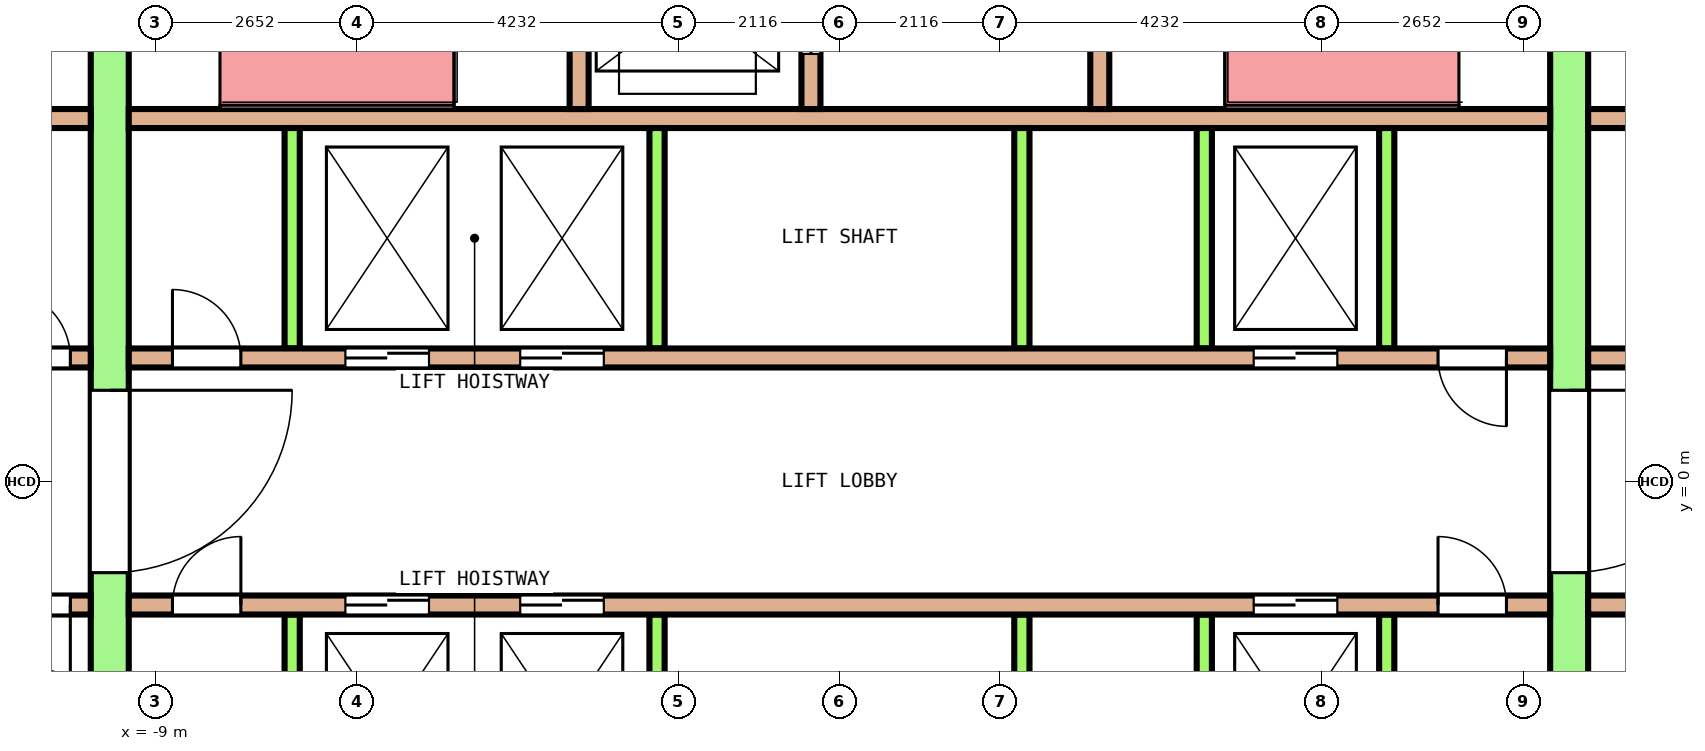
"""IFC4 building model, lengths in metres.
Left out: names, types, materials, properties, quantities, classifications, styles, units other than length and angle.
Written with IfcOpenShell. Run it as: python <this file> out.ifc"""

import sys

from ifc_helpers import new_model, si_unit, direction, frame, frame_2d, origin, place, context, subcontext, project, spatial, rectangle, extrude, element, fill, save


model = new_model("IFC4")
c1 = context("Model", 3, precision=1e-05, world=origin(), true_north=direction((0.0, 1.0)))
c2 = subcontext(c1, "Body", "Model", "MODEL_VIEW")
j1 = project(units=[si_unit("LENGTHUNIT", "METRE"), si_unit("PLANEANGLEUNIT", "RADIAN")], contexts=[c1])
p1 = place(None, origin())
s1 = spatial("IfcSite", under=j1, at=p1, CompositionType="ELEMENT")
p2 = place(p1, origin())
s2 = spatial("IfcBuilding", under=s1, at=p2, CompositionType="ELEMENT")
p3 = place(p2, frame((0.0, 0.0, 154.0)))
s3 = spatial("IfcBuildingStorey", under=s2, at=p3, CompositionType="ELEMENT", Elevation=154.0)
p4 = place(p3, frame((-9.6, -7.75, 0.0), z_axis=(0.0, 0.0, 1.0), x_axis=(0.0, 1.0, 0.0)))
e1 = element("IfcWall", 1, at=p4, inside=s3, PredefinedType="SHEAR", context=c2, shape_type="SweptSolid", body=[
    extrude(rectangle(XDim=15.5, YDim=0.5, at=frame_2d((7.75, 0.0))), origin(), (0.0, 0.0, 1.0), 4.1),
])
p5 = place(p4, frame((6.55, 0.0, 0.0)))
e2 = element("IfcOpeningElement", 2, at=p5, cuts=e1, PredefinedType="OPENING", context=c2, shape_type="SweptSolid", body=[
    extrude(rectangle(XDim=2.4, YDim=2.1, at=frame_2d((1.2, 1.05))), frame((0.0, 0.26, 0.0), z_axis=(0.0, -1.0, 0.0), x_axis=(1.0, 0.0, 0.0)), (0.0, 0.0, 1.0), 0.52),
])
p6 = place(p4, frame((13.45, 0.0, 0.0)))
e3 = element("IfcOpeningElement", 3, at=p6, cuts=e1, PredefinedType="OPENING", context=c2, shape_type="SweptSolid", body=[
    extrude(rectangle(XDim=1.2, YDim=2.1, at=frame_2d((0.6, 1.05))), frame((0.0, 0.26, 0.0), z_axis=(0.0, -1.0, 0.0), x_axis=(1.0, 0.0, 0.0)), (0.0, 0.0, 1.0), 0.52),
])
p7 = place(p4, frame((0.85, 0.0, 0.0)))
e4 = element("IfcOpeningElement", 4, at=p7, cuts=e1, PredefinedType="OPENING", context=c2, shape_type="SweptSolid", body=[
    extrude(rectangle(XDim=1.2, YDim=2.1, at=frame_2d((0.6, 1.05))), frame((0.0, 0.26, 0.0), z_axis=(0.0, -1.0, 0.0), x_axis=(1.0, 0.0, 0.0)), (0.0, 0.0, 1.0), 0.52),
])
p8 = place(p3, frame((9.6, -7.75, 0.0), z_axis=(0.0, 0.0, 1.0), x_axis=(0.0, 1.0, 0.0)))
e5 = element("IfcWall", 5, at=p8, inside=s3, PredefinedType="SHEAR", context=c2, shape_type="SweptSolid", body=[
    extrude(rectangle(XDim=15.5, YDim=0.5, at=frame_2d((7.75, 0.0))), origin(), (0.0, 0.0, 1.0), 4.1),
])
p9 = place(p8, frame((6.55, 0.0, 0.0)))
e6 = element("IfcOpeningElement", 6, at=p9, cuts=e5, PredefinedType="OPENING", context=c2, shape_type="SweptSolid", body=[
    extrude(rectangle(XDim=2.4, YDim=2.1, at=frame_2d((1.2, 1.05))), frame((0.0, 0.26, 0.0), z_axis=(0.0, -1.0, 0.0), x_axis=(1.0, 0.0, 0.0)), (0.0, 0.0, 1.0), 0.52),
])
p10 = place(p8, frame((13.45, 0.0, 0.0)))
e7 = element("IfcOpeningElement", 7, at=p10, cuts=e5, PredefinedType="OPENING", context=c2, shape_type="SweptSolid", body=[
    extrude(rectangle(XDim=1.2, YDim=2.1, at=frame_2d((0.6, 1.05))), frame((0.0, 0.26, 0.0), z_axis=(0.0, -1.0, 0.0), x_axis=(1.0, 0.0, 0.0)), (0.0, 0.0, 1.0), 0.52),
])
p11 = place(p8, frame((0.95, 0.0, 0.0)))
e8 = element("IfcOpeningElement", 8, at=p11, cuts=e5, PredefinedType="OPENING", context=c2, shape_type="SweptSolid", body=[
    extrude(rectangle(XDim=1.0, YDim=2.1, at=frame_2d((0.5, 1.05))), frame((0.0, 0.26, 0.0), z_axis=(0.0, -1.0, 0.0), x_axis=(1.0, 0.0, 0.0)), (0.0, 0.0, 1.0), 0.52),
])
p12 = place(p3, frame((-12.85, 1.625, 0.0), z_axis=(0.0, 0.0, 1.0), x_axis=(1.0, 0.0, 0.0)))
e9 = element("IfcWall", 9, at=p12, inside=s3, PredefinedType="SOLIDWALL", context=c2, shape_type="SweptSolid", body=[
    extrude(rectangle(XDim=3.0, YDim=0.25, at=frame_2d((1.5, 0.0))), origin(), (0.0, 0.0, 1.0), 4.1),
])
p13 = place(p12, frame((0.269, 0.0, 0.0)))
e10 = element("IfcOpeningElement", 10, at=p13, cuts=e9, PredefinedType="OPENING", context=c2, shape_type="SweptSolid", body=[
    extrude(rectangle(XDim=0.9, YDim=2.1, at=frame_2d((0.45, 1.05))), frame((0.0, 0.135, 0.0), z_axis=(0.0, -1.0, 0.0), x_axis=(1.0, 0.0, 0.0)), (0.0, 0.0, 1.0), 0.27),
])
p14 = place(p12, frame((1.831, 0.0, 0.0)))
e11 = element("IfcOpeningElement", 11, at=p14, cuts=e9, PredefinedType="OPENING", context=c2, shape_type="SweptSolid", body=[
    extrude(rectangle(XDim=0.9, YDim=2.1, at=frame_2d((0.45, 1.05))), frame((0.0, 0.135, 0.0), z_axis=(0.0, -1.0, 0.0), x_axis=(1.0, 0.0, 0.0)), (0.0, 0.0, 1.0), 0.27),
])
p15 = place(p3, frame((-9.35, 1.625, 0.0), z_axis=(0.0, 0.0, 1.0), x_axis=(1.0, 0.0, 0.0)))
e12 = element("IfcWall", 12, at=p15, inside=s3, PredefinedType="SOLIDWALL", context=c2, shape_type="SweptSolid", body=[
    extrude(rectangle(XDim=18.7, YDim=0.25, at=frame_2d((9.35, 0.0))), origin(), (0.0, 0.0, 1.0), 4.1),
])
p16 = place(p15, frame((2.85, 0.0, 0.0)))
e13 = element("IfcOpeningElement", 13, at=p16, cuts=e12, PredefinedType="OPENING", context=c2, shape_type="SweptSolid", body=[
    extrude(rectangle(XDim=1.1, YDim=2.1, at=frame_2d((0.55, 1.05))), frame((0.0, 0.135, 0.0), z_axis=(0.0, -1.0, 0.0), x_axis=(1.0, 0.0, 0.0)), (0.0, 0.0, 1.0), 0.27),
])
p17 = place(p15, frame((5.15, 0.0, 0.0)))
e14 = element("IfcOpeningElement", 14, at=p17, cuts=e12, PredefinedType="OPENING", context=c2, shape_type="SweptSolid", body=[
    extrude(rectangle(XDim=1.1, YDim=2.1, at=frame_2d((0.55, 1.05))), frame((0.0, 0.135, 0.0), z_axis=(0.0, -1.0, 0.0), x_axis=(1.0, 0.0, 0.0)), (0.0, 0.0, 1.0), 0.27),
])
p18 = place(p15, frame((14.8, 0.0, 0.0)))
e15 = element("IfcOpeningElement", 15, at=p18, cuts=e12, PredefinedType="OPENING", context=c2, shape_type="SweptSolid", body=[
    extrude(rectangle(XDim=1.1, YDim=2.1, at=frame_2d((0.55, 1.05))), frame((0.0, 0.135, 0.0), z_axis=(0.0, -1.0, 0.0), x_axis=(1.0, 0.0, 0.0)), (0.0, 0.0, 1.0), 0.27),
])
p19 = place(p15, frame((0.575, 0.0, 0.0)))
e16 = element("IfcOpeningElement", 16, at=p19, cuts=e12, PredefinedType="OPENING", context=c2, shape_type="SweptSolid", body=[
    extrude(rectangle(XDim=0.9, YDim=2.1, at=frame_2d((0.45, 1.05))), frame((0.0, 0.135, 0.0), z_axis=(0.0, -1.0, 0.0), x_axis=(1.0, 0.0, 0.0)), (0.0, 0.0, 1.0), 0.27),
])
p20 = place(p15, frame((17.225, 0.0, 0.0)))
e17 = element("IfcOpeningElement", 17, at=p20, cuts=e12, PredefinedType="OPENING", context=c2, shape_type="SweptSolid", body=[
    extrude(rectangle(XDim=0.9, YDim=2.1, at=frame_2d((0.45, 1.05))), frame((0.0, 0.135, 0.0), z_axis=(0.0, -1.0, 0.0), x_axis=(1.0, 0.0, 0.0)), (0.0, 0.0, 1.0), 0.27),
])
p21 = place(p3, frame((9.85, 1.625, 0.0), z_axis=(0.0, 0.0, 1.0), x_axis=(1.0, 0.0, 0.0)))
e18 = element("IfcWall", 18, at=p21, inside=s3, PredefinedType="SOLIDWALL", context=c2, shape_type="SweptSolid", body=[
    extrude(rectangle(XDim=3.0, YDim=0.25, at=frame_2d((1.5, 0.0))), origin(), (0.0, 0.0, 1.0), 4.1),
])
p22 = place(p21, frame((1.05, 0.0, 0.0)))
e19 = element("IfcOpeningElement", 19, at=p22, cuts=e18, PredefinedType="OPENING", context=c2, shape_type="SweptSolid", body=[
    extrude(rectangle(XDim=0.9, YDim=2.1, at=frame_2d((0.45, 1.05))), frame((0.0, 0.135, 0.0), z_axis=(0.0, -1.0, 0.0), x_axis=(1.0, 0.0, 0.0)), (0.0, 0.0, 1.0), 0.27),
])
p23 = place(p3, frame((-12.85, 4.775, 0.0), z_axis=(0.0, 0.0, 1.0), x_axis=(1.0, 0.0, 0.0)))
e20 = element("IfcWall", 20, at=p23, inside=s3, PredefinedType="SOLIDWALL", context=c2, shape_type="SweptSolid", body=[
    extrude(rectangle(XDim=3.0, YDim=0.25, at=frame_2d((1.5, 0.0))), origin(), (0.0, 0.0, 1.0), 4.1),
])
p24 = place(p3, frame((-9.35, 4.775, 0.0), z_axis=(0.0, 0.0, 1.0), x_axis=(1.0, 0.0, 0.0)))
e21 = element("IfcWall", 21, at=p24, inside=s3, PredefinedType="SOLIDWALL", context=c2, shape_type="SweptSolid", body=[
    extrude(rectangle(XDim=18.7, YDim=0.25, at=frame_2d((9.35, 0.0))), origin(), (0.0, 0.0, 1.0), 4.1),
])
p25 = place(p3, frame((9.85, 4.775, 0.0), z_axis=(0.0, 0.0, 1.0), x_axis=(1.0, 0.0, 0.0)))
e22 = element("IfcWall", 22, at=p25, inside=s3, PredefinedType="SOLIDWALL", context=c2, shape_type="SweptSolid", body=[
    extrude(rectangle(XDim=3.0, YDim=0.25, at=frame_2d((1.5, 0.0))), origin(), (0.0, 0.0, 1.0), 4.1),
])
for number, where, z_axis, x_axis in (
    (23, (-7.2, 1.75, 0.0), (0.0, 0.0, 1.0), (0.0, 1.0, 0.0)),
    (24, (-2.4, 1.75, 0.0), (0.0, 0.0, 1.0), (0.0, 1.0, 0.0)),
    (25, (2.4, 1.75, 0.0), (0.0, 0.0, 1.0), (0.0, 1.0, 0.0)),
    (26, (4.8, 1.75, 0.0), (0.0, 0.0, 1.0), (0.0, 1.0, 0.0)),
    (27, (7.2, 1.75, 0.0), (0.0, 0.0, 1.0), (0.0, 1.0, 0.0)),
):
    element("IfcWall", number, at=place(p3, frame(where, z_axis=z_axis, x_axis=x_axis)), inside=s3, PredefinedType="SOLIDWALL", context=c2, shape_type="SweptSolid", body=[
        extrude(rectangle(XDim=2.9, YDim=0.2, at=frame_2d((1.45, 0.0))), origin(), (0.0, 0.0, 1.0), 4.1),
    ])
p26 = place(p3, frame((-12.85, -1.625, 0.0), z_axis=(0.0, 0.0, 1.0), x_axis=(1.0, 0.0, 0.0)))
e28 = element("IfcWall", 28, at=p26, inside=s3, PredefinedType="SOLIDWALL", context=c2, shape_type="SweptSolid", body=[
    extrude(rectangle(XDim=3.0, YDim=0.25, at=frame_2d((1.5, 0.0))), origin(), (0.0, 0.0, 1.0), 4.1),
])
p27 = place(p26, frame((0.269, 0.0, 0.0)))
e29 = element("IfcOpeningElement", 29, at=p27, cuts=e28, PredefinedType="OPENING", context=c2, shape_type="SweptSolid", body=[
    extrude(rectangle(XDim=0.9, YDim=2.1, at=frame_2d((0.45, 1.05))), frame((0.0, 0.135, 0.0), z_axis=(0.0, -1.0, 0.0), x_axis=(1.0, 0.0, 0.0)), (0.0, 0.0, 1.0), 0.27),
])
p28 = place(p26, frame((1.831, 0.0, 0.0)))
e30 = element("IfcOpeningElement", 30, at=p28, cuts=e28, PredefinedType="OPENING", context=c2, shape_type="SweptSolid", body=[
    extrude(rectangle(XDim=0.9, YDim=2.1, at=frame_2d((0.45, 1.05))), frame((0.0, 0.135, 0.0), z_axis=(0.0, -1.0, 0.0), x_axis=(1.0, 0.0, 0.0)), (0.0, 0.0, 1.0), 0.27),
])
p29 = place(p3, frame((-9.35, -1.625, 0.0), z_axis=(0.0, 0.0, 1.0), x_axis=(1.0, 0.0, 0.0)))
e31 = element("IfcWall", 31, at=p29, inside=s3, PredefinedType="SOLIDWALL", context=c2, shape_type="SweptSolid", body=[
    extrude(rectangle(XDim=18.7, YDim=0.25, at=frame_2d((9.35, 0.0))), origin(), (0.0, 0.0, 1.0), 4.1),
])
p30 = place(p29, frame((2.85, 0.0, 0.0)))
e32 = element("IfcOpeningElement", 32, at=p30, cuts=e31, PredefinedType="OPENING", context=c2, shape_type="SweptSolid", body=[
    extrude(rectangle(XDim=1.1, YDim=2.1, at=frame_2d((0.55, 1.05))), frame((0.0, 0.135, 0.0), z_axis=(0.0, -1.0, 0.0), x_axis=(1.0, 0.0, 0.0)), (0.0, 0.0, 1.0), 0.27),
])
p31 = place(p29, frame((5.15, 0.0, 0.0)))
e33 = element("IfcOpeningElement", 33, at=p31, cuts=e31, PredefinedType="OPENING", context=c2, shape_type="SweptSolid", body=[
    extrude(rectangle(XDim=1.1, YDim=2.1, at=frame_2d((0.55, 1.05))), frame((0.0, 0.135, 0.0), z_axis=(0.0, -1.0, 0.0), x_axis=(1.0, 0.0, 0.0)), (0.0, 0.0, 1.0), 0.27),
])
p32 = place(p29, frame((14.8, 0.0, 0.0)))
e34 = element("IfcOpeningElement", 34, at=p32, cuts=e31, PredefinedType="OPENING", context=c2, shape_type="SweptSolid", body=[
    extrude(rectangle(XDim=1.1, YDim=2.1, at=frame_2d((0.55, 1.05))), frame((0.0, 0.135, 0.0), z_axis=(0.0, -1.0, 0.0), x_axis=(1.0, 0.0, 0.0)), (0.0, 0.0, 1.0), 0.27),
])
p33 = place(p29, frame((0.575, 0.0, 0.0)))
e35 = element("IfcOpeningElement", 35, at=p33, cuts=e31, PredefinedType="OPENING", context=c2, shape_type="SweptSolid", body=[
    extrude(rectangle(XDim=0.9, YDim=2.1, at=frame_2d((0.45, 1.05))), frame((0.0, 0.135, 0.0), z_axis=(0.0, -1.0, 0.0), x_axis=(1.0, 0.0, 0.0)), (0.0, 0.0, 1.0), 0.27),
])
p34 = place(p29, frame((17.225, 0.0, 0.0)))
e36 = element("IfcOpeningElement", 36, at=p34, cuts=e31, PredefinedType="OPENING", context=c2, shape_type="SweptSolid", body=[
    extrude(rectangle(XDim=0.9, YDim=2.1, at=frame_2d((0.45, 1.05))), frame((0.0, 0.135, 0.0), z_axis=(0.0, -1.0, 0.0), x_axis=(1.0, 0.0, 0.0)), (0.0, 0.0, 1.0), 0.27),
])
p35 = place(p3, frame((9.85, -1.625, 0.0), z_axis=(0.0, 0.0, 1.0), x_axis=(1.0, 0.0, 0.0)))
e37 = element("IfcWall", 37, at=p35, inside=s3, PredefinedType="SOLIDWALL", context=c2, shape_type="SweptSolid", body=[
    extrude(rectangle(XDim=3.0, YDim=0.25, at=frame_2d((1.5, 0.0))), origin(), (0.0, 0.0, 1.0), 4.1),
])
p36 = place(p35, frame((1.05, 0.0, 0.0)))
e38 = element("IfcOpeningElement", 38, at=p36, cuts=e37, PredefinedType="OPENING", context=c2, shape_type="SweptSolid", body=[
    extrude(rectangle(XDim=0.9, YDim=2.1, at=frame_2d((0.45, 1.05))), frame((0.0, 0.135, 0.0), z_axis=(0.0, -1.0, 0.0), x_axis=(1.0, 0.0, 0.0)), (0.0, 0.0, 1.0), 0.27),
])
for number, where, z_axis, x_axis in (
    (39, (-7.2, -4.65, 0.0), (0.0, 0.0, 1.0), (0.0, 1.0, 0.0)),
    (40, (-2.4, -4.65, 0.0), (0.0, 0.0, 1.0), (0.0, 1.0, 0.0)),
    (41, (2.4, -4.65, 0.0), (0.0, 0.0, 1.0), (0.0, 1.0, 0.0)),
    (42, (4.8, -4.65, 0.0), (0.0, 0.0, 1.0), (0.0, 1.0, 0.0)),
    (43, (7.2, -4.65, 0.0), (0.0, 0.0, 1.0), (0.0, 1.0, 0.0)),
):
    element("IfcWall", number, at=place(p3, frame(where, z_axis=z_axis, x_axis=x_axis)), inside=s3, PredefinedType="SOLIDWALL", context=c2, shape_type="SweptSolid", body=[
        extrude(rectangle(XDim=2.9, YDim=0.2, at=frame_2d((1.45, 0.0))), origin(), (0.0, 0.0, 1.0), 4.1),
    ])
p37 = place(p3, frame((-3.425, 4.9, 0.0), z_axis=(0.0, 0.0, 1.0), x_axis=(0.0, 1.0, 0.0)))
e44 = element("IfcWall", 44, at=p37, inside=s3, PredefinedType="SOLIDWALL", context=c2, shape_type="SweptSolid", body=[
    extrude(rectangle(XDim=2.85, YDim=0.25, at=frame_2d((1.425, 0.0))), origin(), (0.0, 0.0, 1.0), 4.1),
])
p38 = place(p3, frame((-0.375, 4.9, 0.0), z_axis=(0.0, 0.0, 1.0), x_axis=(0.0, 1.0, 0.0)))
e45 = element("IfcWall", 45, at=p38, inside=s3, PredefinedType="SOLIDWALL", context=c2, shape_type="SweptSolid", body=[
    extrude(rectangle(XDim=2.85, YDim=0.25, at=frame_2d((1.425, 0.0))), origin(), (0.0, 0.0, 1.0), 4.1),
])
p39 = place(p38, frame((0.725, 0.0, 0.0)))
e46 = element("IfcOpeningElement", 46, at=p39, cuts=e45, PredefinedType="OPENING", context=c2, shape_type="SweptSolid", body=[
    extrude(rectangle(XDim=1.4, YDim=2.1, at=frame_2d((0.7, 1.05))), frame((0.0, 0.135, 0.0), z_axis=(0.0, -1.0, 0.0), x_axis=(1.0, 0.0, 0.0)), (0.0, 0.0, 1.0), 0.27),
])
p40 = place(p3, frame((3.425, 4.9, 0.0), z_axis=(0.0, 0.0, 1.0), x_axis=(0.0, 1.0, 0.0)))
e47 = element("IfcWall", 47, at=p40, inside=s3, PredefinedType="SOLIDWALL", context=c2, shape_type="SweptSolid", body=[
    extrude(rectangle(XDim=2.85, YDim=0.25, at=frame_2d((1.425, 0.0))), origin(), (0.0, 0.0, 1.0), 4.1),
])
p41 = place(p16, origin())
e48 = element("IfcDoor", 48, at=p41, inside=s3, OperationType="DOUBLE_DOOR_SLIDING", PredefinedType="DOOR", context=c2, shape_type="SweptSolid", body=[
    extrude(rectangle(XDim=1.1, YDim=2.1, at=frame_2d((0.55, 1.05))), frame((0.0, 0.075, 0.0), z_axis=(0.0, -1.0, 0.0), x_axis=(1.0, 0.0, 0.0)), (0.0, 0.0, 1.0), 0.15),
])
fill(e13, e48)
p42 = place(p17, origin())
e49 = element("IfcDoor", 49, at=p42, inside=s3, OperationType="DOUBLE_DOOR_SLIDING", PredefinedType="DOOR", context=c2, shape_type="SweptSolid", body=[
    extrude(rectangle(XDim=1.1, YDim=2.1, at=frame_2d((0.55, 1.05))), frame((0.0, 0.075, 0.0), z_axis=(0.0, -1.0, 0.0), x_axis=(1.0, 0.0, 0.0)), (0.0, 0.0, 1.0), 0.15),
])
fill(e14, e49)
p43 = place(p18, origin())
e50 = element("IfcDoor", 50, at=p43, inside=s3, OperationType="DOUBLE_DOOR_SLIDING", PredefinedType="DOOR", context=c2, shape_type="SweptSolid", body=[
    extrude(rectangle(XDim=1.1, YDim=2.1, at=frame_2d((0.55, 1.05))), frame((0.0, 0.075, 0.0), z_axis=(0.0, -1.0, 0.0), x_axis=(1.0, 0.0, 0.0)), (0.0, 0.0, 1.0), 0.15),
])
fill(e15, e50)
p44 = place(p30, origin())
e51 = element("IfcDoor", 51, at=p44, inside=s3, OperationType="DOUBLE_DOOR_SLIDING", PredefinedType="DOOR", context=c2, shape_type="SweptSolid", body=[
    extrude(rectangle(XDim=1.1, YDim=2.1, at=frame_2d((0.55, 1.05))), frame((0.0, 0.075, 0.0), z_axis=(0.0, -1.0, 0.0), x_axis=(1.0, 0.0, 0.0)), (0.0, 0.0, 1.0), 0.15),
])
fill(e32, e51)
p45 = place(p31, origin())
e52 = element("IfcDoor", 52, at=p45, inside=s3, OperationType="DOUBLE_DOOR_SLIDING", PredefinedType="DOOR", context=c2, shape_type="SweptSolid", body=[
    extrude(rectangle(XDim=1.1, YDim=2.1, at=frame_2d((0.55, 1.05))), frame((0.0, 0.075, 0.0), z_axis=(0.0, -1.0, 0.0), x_axis=(1.0, 0.0, 0.0)), (0.0, 0.0, 1.0), 0.15),
])
fill(e33, e52)
p46 = place(p32, origin())
e53 = element("IfcDoor", 53, at=p46, inside=s3, OperationType="DOUBLE_DOOR_SLIDING", PredefinedType="DOOR", context=c2, shape_type="SweptSolid", body=[
    extrude(rectangle(XDim=1.1, YDim=2.1, at=frame_2d((0.55, 1.05))), frame((0.0, 0.075, 0.0), z_axis=(0.0, -1.0, 0.0), x_axis=(1.0, 0.0, 0.0)), (0.0, 0.0, 1.0), 0.15),
])
fill(e34, e53)
p47 = place(p39, origin())
e54 = element("IfcDoor", 54, at=p47, inside=s3, OperationType="DOUBLE_DOOR_SLIDING", PredefinedType="DOOR", context=c2, shape_type="SweptSolid", body=[
    extrude(rectangle(XDim=1.4, YDim=2.1, at=frame_2d((0.7, 1.05))), frame((0.0, 0.075, 0.0), z_axis=(0.0, -1.0, 0.0), x_axis=(1.0, 0.0, 0.0)), (0.0, 0.0, 1.0), 0.15),
])
fill(e46, e54)
p48 = place(p5, origin())
e55 = element("IfcDoor", 55, at=p48, inside=s3, OperationType="DOUBLE_DOOR_SINGLE_SWING", PredefinedType="DOOR", context=c2, shape_type="SweptSolid", body=[
    extrude(rectangle(XDim=2.4, YDim=2.1, at=frame_2d((1.2, 1.05))), frame((0.0, 0.2, 0.0), z_axis=(0.0, -1.0, 0.0), x_axis=(1.0, 0.0, 0.0)), (0.0, 0.0, 1.0), 0.4),
])
fill(e2, e55)
p49 = place(p9, origin())
e56 = element("IfcDoor", 56, at=p49, inside=s3, OperationType="DOUBLE_DOOR_SINGLE_SWING", PredefinedType="DOOR", context=c2, shape_type="SweptSolid", body=[
    extrude(rectangle(XDim=2.4, YDim=2.1, at=frame_2d((1.2, 1.05))), frame((0.0, 0.2, 0.0), z_axis=(0.0, -1.0, 0.0), x_axis=(1.0, 0.0, 0.0)), (0.0, 0.0, 1.0), 0.4),
])
fill(e6, e56)
p50 = place(p14, origin())
e57 = element("IfcDoor", 57, at=p50, inside=s3, OperationType="SINGLE_SWING_RIGHT", PredefinedType="DOOR", context=c2, shape_type="SweptSolid", body=[
    extrude(rectangle(XDim=0.9, YDim=2.1, at=frame_2d((0.45, 1.05))), frame((0.0, 0.075, 0.0), z_axis=(0.0, -1.0, 0.0), x_axis=(1.0, 0.0, 0.0)), (0.0, 0.0, 1.0), 0.15),
])
fill(e11, e57)
p51 = place(p19, origin())
e58 = element("IfcDoor", 58, at=p51, inside=s3, OperationType="SINGLE_SWING_LEFT", PredefinedType="DOOR", context=c2, shape_type="SweptSolid", body=[
    extrude(rectangle(XDim=0.9, YDim=2.1, at=frame_2d((0.45, 1.05))), frame((0.0, 0.075, 0.0), z_axis=(0.0, -1.0, 0.0), x_axis=(1.0, 0.0, 0.0)), (0.0, 0.0, 1.0), 0.15),
])
fill(e16, e58)
p52 = place(p20, origin())
e59 = element("IfcDoor", 59, at=p52, inside=s3, OperationType="SINGLE_SWING_RIGHT", PredefinedType="DOOR", context=c2, shape_type="SweptSolid", body=[
    extrude(rectangle(XDim=0.9, YDim=2.1, at=frame_2d((0.45, 1.05))), frame((0.0, 0.075, 0.0), z_axis=(0.0, -1.0, 0.0), x_axis=(1.0, 0.0, 0.0)), (0.0, 0.0, 1.0), 0.15),
])
fill(e17, e59)
p53 = place(p28, origin())
e60 = element("IfcDoor", 60, at=p53, inside=s3, OperationType="SINGLE_SWING_LEFT", PredefinedType="DOOR", context=c2, shape_type="SweptSolid", body=[
    extrude(rectangle(XDim=0.9, YDim=2.1, at=frame_2d((0.45, 1.05))), frame((0.0, 0.075, 0.0), z_axis=(0.0, -1.0, 0.0), x_axis=(1.0, 0.0, 0.0)), (0.0, 0.0, 1.0), 0.15),
])
fill(e30, e60)
p54 = place(p33, origin())
e61 = element("IfcDoor", 61, at=p54, inside=s3, OperationType="SINGLE_SWING_RIGHT", PredefinedType="DOOR", context=c2, shape_type="SweptSolid", body=[
    extrude(rectangle(XDim=0.9, YDim=2.1, at=frame_2d((0.45, 1.05))), frame((0.0, 0.075, 0.0), z_axis=(0.0, -1.0, 0.0), x_axis=(1.0, 0.0, 0.0)), (0.0, 0.0, 1.0), 0.15),
])
fill(e35, e61)
p55 = place(p34, origin())
e62 = element("IfcDoor", 62, at=p55, inside=s3, OperationType="SINGLE_SWING_LEFT", PredefinedType="DOOR", context=c2, shape_type="SweptSolid", body=[
    extrude(rectangle(XDim=0.9, YDim=2.1, at=frame_2d((0.45, 1.05))), frame((0.0, 0.075, 0.0), z_axis=(0.0, -1.0, 0.0), x_axis=(1.0, 0.0, 0.0)), (0.0, 0.0, 1.0), 0.15),
])
fill(e36, e62)
save(model, sys.argv[1])
